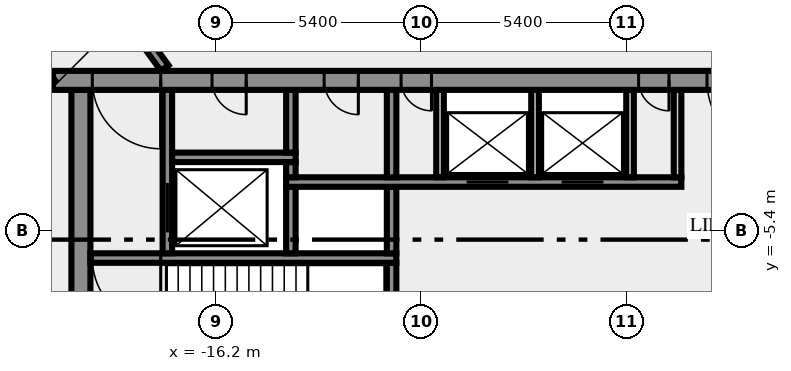
"""IFC4 building model, lengths in metres.
Left out: names, types, materials, properties, quantities, classifications, styles, units other than length and angle.
Written with IfcOpenShell. Run it as: python <this file> out.ifc"""

import sys

from ifc_helpers import new_model, si_unit, direction, frame, frame_2d, origin, place, context, subcontext, project, spatial, rectangle, extrude, element, fill, save


model = new_model("IFC4")
c1 = context("Model", 3, precision=1e-05, world=origin(), true_north=direction((0.0, 1.0)))
c2 = subcontext(c1, "Body", "Model", "MODEL_VIEW")
j1 = project(units=[si_unit("LENGTHUNIT", "METRE"), si_unit("PLANEANGLEUNIT", "RADIAN")], contexts=[c1])
p1 = place(None, origin())
s1 = spatial("IfcSite", under=j1, at=p1, CompositionType="ELEMENT")
p2 = place(p1, origin())
s2 = spatial("IfcBuilding", under=s1, at=p2, CompositionType="ELEMENT")
p3 = place(p2, frame((0.0, 0.0, 261.0)))
s3 = spatial("IfcBuildingStorey", under=s2, at=p3, CompositionType="ELEMENT", Elevation=261.0)
p4 = place(p3, frame((-19.75, -10.5, 0.0), z_axis=(0.0, 0.0, 1.0), x_axis=(0.0, 1.0, 0.0)))
e1 = element("IfcWall", 1, at=p4, inside=s3, PredefinedType="SHEAR", context=c2, shape_type="SweptSolid", body=[
    extrude(rectangle(XDim=8.8, YDim=0.5, at=frame_2d((4.4, 0.0))), origin(), (0.0, 0.0, 1.0), 3.65),
])
p5 = place(p3, frame((-11.575, -7.25, 0.0), z_axis=(0.0, 0.0, 1.0), x_axis=(0.0, 1.0, 0.0)))
e2 = element("IfcWall", 2, at=p5, inside=s3, PredefinedType="SHEAR", context=c2, shape_type="SweptSolid", body=[
    extrude(rectangle(XDim=1.0, YDim=0.25, at=frame_2d((0.5, 0.0))), origin(), (0.0, 0.0, 1.0), 3.65),
])
p6 = place(p3, frame((-11.45, -6.125, 0.0), z_axis=(0.0, 0.0, 1.0), x_axis=(-1.0, 0.0, 0.0)))
e3 = element("IfcWall", 3, at=p6, inside=s3, PredefinedType="SHEAR", context=c2, shape_type="SweptSolid", body=[
    extrude(rectangle(XDim=8.05, YDim=0.25, at=frame_2d((4.025, 0.0))), origin(), (0.0, 0.0, 1.0), 3.65),
])
p7 = place(p6, frame((6.2, 0.0, 0.0)))
e4 = element("IfcOpeningElement", 4, at=p7, cuts=e3, PredefinedType="OPENING", context=c2, shape_type="SweptSolid", body=[
    extrude(rectangle(XDim=1.8, YDim=2.1, at=frame_2d((0.9, 1.05))), frame((0.0, 0.135, 0.0), z_axis=(0.0, -1.0, 0.0), x_axis=(1.0, 0.0, 0.0)), (0.0, 0.0, 1.0), 0.27),
])
p8 = place(p3, frame((-17.475, -6.0, 0.0), z_axis=(0.0, 0.0, 1.0), x_axis=(0.0, 1.0, 0.0)))
e5 = element("IfcWall", 5, at=p8, inside=s3, PredefinedType="SHEAR", context=c2, shape_type="SweptSolid", body=[
    extrude(rectangle(XDim=4.3, YDim=0.25, at=frame_2d((2.15, 0.0))), origin(), (0.0, 0.0, 1.0), 3.65),
])
p9 = place(p8, frame((0.55, 0.0, 0.0)))
e6 = element("IfcOpeningElement", 6, at=p9, cuts=e5, PredefinedType="OPENING", context=c2, shape_type="SweptSolid", body=[
    extrude(rectangle(XDim=1.3, YDim=2.1, at=frame_2d((0.65, 1.05))), frame((0.0, 0.135, 0.0), z_axis=(0.0, -1.0, 0.0), x_axis=(1.0, 0.0, 0.0)), (0.0, 0.0, 1.0), 0.27),
])
for number, where, z_axis, x_axis in (
    (7, (-14.225, -6.0, 0.0), (0.0, 0.0, 1.0), (0.0, 1.0, 0.0)),
    (8, (-11.575, -6.0, 0.0), (0.0, 0.0, 1.0), (0.0, 1.0, 0.0)),
):
    element("IfcWall", number, at=place(p3, frame(where, z_axis=z_axis, x_axis=x_axis)), inside=s3, PredefinedType="SHEAR", context=c2, shape_type="SweptSolid", body=[
        extrude(rectangle(XDim=1.75, YDim=0.25, at=frame_2d((0.875, 0.0))), origin(), (0.0, 0.0, 1.0), 3.65),
    ])
p10 = place(p3, frame((-14.35, -4.125, 0.0), z_axis=(0.0, 0.0, 1.0), x_axis=(1.0, 0.0, 0.0)))
e9 = element("IfcWall", 9, at=p10, inside=s3, PredefinedType="SHEAR", context=c2, shape_type="SweptSolid", body=[
    extrude(rectangle(XDim=10.4, YDim=0.25, at=frame_2d((5.2, 0.0))), origin(), (0.0, 0.0, 1.0), 3.65),
])
p11 = place(p10, frame((4.75, 0.0, 0.0)))
e10 = element("IfcOpeningElement", 10, at=p11, cuts=e9, PredefinedType="OPENING", context=c2, shape_type="SweptSolid", body=[
    extrude(rectangle(XDim=1.1, YDim=2.1, at=frame_2d((0.55, 1.05))), frame((0.0, 0.135, 0.0), z_axis=(0.0, -1.0, 0.0), x_axis=(1.0, 0.0, 0.0)), (0.0, 0.0, 1.0), 0.27),
])
p12 = place(p10, frame((7.25, 0.0, 0.0)))
e11 = element("IfcOpeningElement", 11, at=p12, cuts=e9, PredefinedType="OPENING", context=c2, shape_type="SweptSolid", body=[
    extrude(rectangle(XDim=1.1, YDim=2.1, at=frame_2d((0.55, 1.05))), frame((0.0, 0.135, 0.0), z_axis=(0.0, -1.0, 0.0), x_axis=(1.0, 0.0, 0.0)), (0.0, 0.0, 1.0), 0.27),
])
p13 = place(p3, frame((-14.225, -4.0, 0.0), z_axis=(0.0, 0.0, 1.0), x_axis=(0.0, 1.0, 0.0)))
e12 = element("IfcWall", 12, at=p13, inside=s3, PredefinedType="SHEAR", context=c2, shape_type="SweptSolid", body=[
    extrude(rectangle(XDim=0.4, YDim=0.25, at=frame_2d((0.2, 0.0))), origin(), (0.0, 0.0, 1.0), 3.65),
])
p14 = place(p3, frame((-11.575, -4.0, 0.0), z_axis=(0.0, 0.0, 1.0), x_axis=(0.0, 1.0, 0.0)))
e13 = element("IfcWall", 13, at=p14, inside=s3, PredefinedType="SHEAR", context=c2, shape_type="SweptSolid", body=[
    extrude(rectangle(XDim=2.3, YDim=0.25, at=frame_2d((1.15, 0.0))), origin(), (0.0, 0.0, 1.0), 3.65),
])
for number, where, z_axis, x_axis in (
    (14, (-10.3, -4.0, 0.0), (0.0, 0.0, 1.0), (0.0, 1.0, 0.0)),
    (15, (-7.8, -4.0, 0.0), (0.0, 0.0, 1.0), (0.0, 1.0, 0.0)),
    (16, (-5.3, -4.0, 0.0), (0.0, 0.0, 1.0), (0.0, 1.0, 0.0)),
    (17, (-4.05, -4.0, 0.0), (0.0, 0.0, 1.0), (0.0, 1.0, 0.0)),
):
    element("IfcWall", number, at=place(p3, frame(where, z_axis=z_axis, x_axis=x_axis)), inside=s3, PredefinedType="SOLIDWALL", context=c2, shape_type="SweptSolid", body=[
        extrude(rectangle(XDim=2.3, YDim=0.2, at=frame_2d((1.15, 0.0))), origin(), (0.0, 0.0, 1.0), 3.65),
    ])
p15 = place(p3, frame((-17.35, -3.475, 0.0), z_axis=(0.0, 0.0, 1.0), x_axis=(1.0, 0.0, 0.0)))
e18 = element("IfcWall", 18, at=p15, inside=s3, PredefinedType="SHEAR", context=c2, shape_type="SweptSolid", body=[
    extrude(rectangle(XDim=3.25, YDim=0.25, at=frame_2d((1.625, 0.0))), origin(), (0.0, 0.0, 1.0), 3.65),
])
p16 = place(p3, frame((-14.225, -3.35, 0.0), z_axis=(0.0, 0.0, 1.0), x_axis=(0.0, 1.0, 0.0)))
e19 = element("IfcWall", 19, at=p16, inside=s3, PredefinedType="SHEAR", context=c2, shape_type="SweptSolid", body=[
    extrude(rectangle(XDim=1.65, YDim=0.25, at=frame_2d((0.825, 0.0))), origin(), (0.0, 0.0, 1.0), 3.65),
])
p17 = place(p3, frame((20.49, -1.45, 0.0), z_axis=(0.0, 0.0, 1.0), x_axis=(-1.0, 0.0, 0.0)))
e20 = element("IfcWall", 20, at=p17, inside=s3, PredefinedType="SHEAR", context=c2, shape_type="SweptSolid", body=[
    extrude(rectangle(XDim=40.98, YDim=0.5, at=frame_2d((20.49, 0.0))), origin(), (0.0, 0.0, 1.0), 3.65),
])
p18 = place(p17, frame((38.14, 0.0, 0.0)))
e21 = element("IfcOpeningElement", 21, at=p18, cuts=e20, PredefinedType="OPENING", context=c2, shape_type="SweptSolid", body=[
    extrude(rectangle(XDim=1.8, YDim=2.1, at=frame_2d((0.9, 1.05))), frame((0.0, 0.26, 0.0), z_axis=(0.0, -1.0, 0.0), x_axis=(1.0, 0.0, 0.0)), (0.0, 0.0, 1.0), 0.52),
])
p19 = place(p17, frame((35.89, 0.0, 0.0)))
e22 = element("IfcOpeningElement", 22, at=p19, cuts=e20, PredefinedType="OPENING", context=c2, shape_type="SweptSolid", body=[
    extrude(rectangle(XDim=0.9, YDim=2.1, at=frame_2d((0.45, 1.05))), frame((0.0, 0.26, 0.0), z_axis=(0.0, -1.0, 0.0), x_axis=(1.0, 0.0, 0.0)), (0.0, 0.0, 1.0), 0.52),
])
p20 = place(p17, frame((32.94, 0.0, 0.0)))
e23 = element("IfcOpeningElement", 23, at=p20, cuts=e20, PredefinedType="OPENING", context=c2, shape_type="SweptSolid", body=[
    extrude(rectangle(XDim=0.9, YDim=2.1, at=frame_2d((0.45, 1.05))), frame((0.0, 0.26, 0.0), z_axis=(0.0, -1.0, 0.0), x_axis=(1.0, 0.0, 0.0)), (0.0, 0.0, 1.0), 0.52),
])
p21 = place(p17, frame((31.015, 0.0, 0.0)))
e24 = element("IfcOpeningElement", 24, at=p21, cuts=e20, PredefinedType="OPENING", context=c2, shape_type="SweptSolid", body=[
    extrude(rectangle(XDim=0.8, YDim=2.1, at=frame_2d((0.4, 1.05))), frame((0.0, 0.26, 0.0), z_axis=(0.0, -1.0, 0.0), x_axis=(1.0, 0.0, 0.0)), (0.0, 0.0, 1.0), 0.52),
])
p22 = place(p17, frame((24.765, 0.0, 0.0)))
e25 = element("IfcOpeningElement", 25, at=p22, cuts=e20, PredefinedType="OPENING", context=c2, shape_type="SweptSolid", body=[
    extrude(rectangle(XDim=0.8, YDim=2.1, at=frame_2d((0.4, 1.05))), frame((0.0, 0.26, 0.0), z_axis=(0.0, -1.0, 0.0), x_axis=(1.0, 0.0, 0.0)), (0.0, 0.0, 1.0), 0.52),
])
p23 = place(p17, frame((21.765, 0.0, 0.0)))
e26 = element("IfcOpeningElement", 26, at=p23, cuts=e20, PredefinedType="OPENING", context=c2, shape_type="SweptSolid", body=[
    extrude(rectangle(XDim=2.0, YDim=2.1, at=frame_2d((1.0, 1.05))), frame((0.0, 0.26, 0.0), z_axis=(0.0, -1.0, 0.0), x_axis=(1.0, 0.0, 0.0)), (0.0, 0.0, 1.0), 0.52),
])
p24 = place(p17, frame((14.202, 0.0, 0.0)))
e27 = element("IfcOpeningElement", 27, at=p24, cuts=e20, PredefinedType="OPENING", context=c2, shape_type="SweptSolid", body=[
    extrude(rectangle(XDim=0.9, YDim=2.1, at=frame_2d((0.45, 1.05))), frame((0.0, 0.26, 0.0), z_axis=(0.0, -1.0, 0.0), x_axis=(1.0, 0.0, 0.0)), (0.0, 0.0, 1.0), 0.52),
])
p25 = place(p17, frame((10.478, 0.0, 0.0)))
e28 = element("IfcOpeningElement", 28, at=p25, cuts=e20, PredefinedType="OPENING", context=c2, shape_type="SweptSolid", body=[
    extrude(rectangle(XDim=0.9, YDim=2.1, at=frame_2d((0.45, 1.05))), frame((0.0, 0.26, 0.0), z_axis=(0.0, -1.0, 0.0), x_axis=(1.0, 0.0, 0.0)), (0.0, 0.0, 1.0), 0.52),
])
p26 = place(p17, frame((7.14, 0.0, 0.0)))
e29 = element("IfcOpeningElement", 29, at=p26, cuts=e20, PredefinedType="OPENING", context=c2, shape_type="SweptSolid", body=[
    extrude(rectangle(XDim=0.9, YDim=2.1, at=frame_2d((0.45, 1.05))), frame((0.0, 0.26, 0.0), z_axis=(0.0, -1.0, 0.0), x_axis=(1.0, 0.0, 0.0)), (0.0, 0.0, 1.0), 0.52),
])
p27 = place(p17, frame((5.028, 0.0, 0.0)))
e30 = element("IfcOpeningElement", 30, at=p27, cuts=e20, PredefinedType="OPENING", context=c2, shape_type="SweptSolid", body=[
    extrude(rectangle(XDim=0.8, YDim=2.1, at=frame_2d((0.4, 1.05))), frame((0.0, 0.26, 0.0), z_axis=(0.0, -1.0, 0.0), x_axis=(1.0, 0.0, 0.0)), (0.0, 0.0, 1.0), 0.52),
])
p28 = place(p17, frame((3.452, 0.0, 0.0)))
e31 = element("IfcOpeningElement", 31, at=p28, cuts=e20, PredefinedType="OPENING", context=c2, shape_type="SweptSolid", body=[
    extrude(rectangle(XDim=0.8, YDim=2.1, at=frame_2d((0.4, 1.05))), frame((0.0, 0.26, 0.0), z_axis=(0.0, -1.0, 0.0), x_axis=(1.0, 0.0, 0.0)), (0.0, 0.0, 1.0), 0.52),
])
p29 = place(p17, frame((1.04, 0.0, 0.0)))
e32 = element("IfcOpeningElement", 32, at=p29, cuts=e20, PredefinedType="OPENING", context=c2, shape_type="SweptSolid", body=[
    extrude(rectangle(XDim=1.8, YDim=2.1, at=frame_2d((0.9, 1.05))), frame((0.0, 0.26, 0.0), z_axis=(0.0, -1.0, 0.0), x_axis=(1.0, 0.0, 0.0)), (0.0, 0.0, 1.0), 0.52),
])
p30 = place(p3, frame((-20.531, -1.523, 0.0), z_axis=(0.0, 0.0, 1.0), x_axis=(-0.587782646447, 0.809018887626, 0.0)))
e33 = element("IfcWall", 33, at=p30, inside=s3, PredefinedType="SOLIDWALL", context=c2, shape_type="SweptSolid", body=[
    extrude(rectangle(XDim=11.27, YDim=0.25, at=frame_2d((5.635, 0.0))), origin(), (0.0, 0.0, 1.0), 3.65),
])
p31 = place(p30, frame((0.533, 0.0, 0.0)))
e34 = element("IfcOpeningElement", 34, at=p31, cuts=e33, PredefinedType="OPENING", context=c2, shape_type="SweptSolid", body=[
    extrude(rectangle(XDim=0.9, YDim=2.1, at=frame_2d((0.45, 1.05))), frame((0.0, 0.135, 0.0), z_axis=(0.0, -1.0, 0.0), x_axis=(1.0, 0.0, 0.0)), (0.0, 0.0, 1.0), 0.27),
])
p32 = place(p3, frame((-24.865, 8.95, 0.0), z_axis=(0.0, 0.0, 1.0), x_axis=(0.587791617212, -0.809012369952, 0.0)))
e35 = element("IfcWall", 35, at=p32, inside=s3, PredefinedType="SOLIDWALL", context=c2, shape_type="SweptSolid", body=[
    extrude(rectangle(XDim=12.453, YDim=0.25, at=frame_2d((6.227, 0.0))), origin(), (0.0, 0.0, 1.0), 3.65),
])
p33 = place(p32, frame((8.112, 0.0, 0.0)))
e36 = element("IfcOpeningElement", 36, at=p33, cuts=e35, PredefinedType="OPENING", context=c2, shape_type="SweptSolid", body=[
    extrude(rectangle(XDim=0.9, YDim=2.1, at=frame_2d((0.45, 1.05))), frame((0.0, 0.135, 0.0), z_axis=(0.0, -1.0, 0.0), x_axis=(1.0, 0.0, 0.0)), (0.0, 0.0, 1.0), 0.27),
])
p34 = place(p7, origin())
e37 = element("IfcDoor", 37, at=p34, inside=s3, OperationType="DOUBLE_DOOR_SINGLE_SWING", PredefinedType="DOOR", context=c2, shape_type="SweptSolid", body=[
    extrude(rectangle(XDim=1.8, YDim=2.1, at=frame_2d((0.9, 1.05))), frame((0.0, 0.025, 0.0), z_axis=(0.0, -1.0, 0.0), x_axis=(1.0, 0.0, 0.0)), (0.0, 0.0, 1.0), 0.05),
])
fill(e4, e37)
p35 = place(p9, origin())
e38 = element("IfcDoor", 38, at=p35, inside=s3, OperationType="DOUBLE_DOOR_SLIDING", PredefinedType="DOOR", context=c2, shape_type="SweptSolid", body=[
    extrude(rectangle(XDim=1.3, YDim=2.1, at=frame_2d((0.65, 1.05))), frame((0.0, 0.025, 0.0), z_axis=(0.0, -1.0, 0.0), x_axis=(1.0, 0.0, 0.0)), (0.0, 0.0, 1.0), 0.05),
])
fill(e6, e38)
p36 = place(p11, origin())
e39 = element("IfcDoor", 39, at=p36, inside=s3, OperationType="DOUBLE_DOOR_SLIDING", PredefinedType="DOOR", context=c2, shape_type="SweptSolid", body=[
    extrude(rectangle(XDim=1.1, YDim=2.1, at=frame_2d((0.55, 1.05))), frame((0.0, 0.025, 0.0), z_axis=(0.0, -1.0, 0.0), x_axis=(1.0, 0.0, 0.0)), (0.0, 0.0, 1.0), 0.05),
])
fill(e10, e39)
p37 = place(p12, origin())
e40 = element("IfcDoor", 40, at=p37, inside=s3, OperationType="DOUBLE_DOOR_SLIDING", PredefinedType="DOOR", context=c2, shape_type="SweptSolid", body=[
    extrude(rectangle(XDim=1.1, YDim=2.1, at=frame_2d((0.55, 1.05))), frame((0.0, 0.025, 0.0), z_axis=(0.0, -1.0, 0.0), x_axis=(1.0, 0.0, 0.0)), (0.0, 0.0, 1.0), 0.05),
])
fill(e11, e40)
p38 = place(p18, origin())
e41 = element("IfcDoor", 41, at=p38, inside=s3, OperationType="DOUBLE_DOOR_SINGLE_SWING", PredefinedType="DOOR", context=c2, shape_type="SweptSolid", body=[
    extrude(rectangle(XDim=1.8, YDim=2.1, at=frame_2d((0.9, 1.05))), frame((0.0, 0.025, 0.0), z_axis=(0.0, -1.0, 0.0), x_axis=(1.0, 0.0, 0.0)), (0.0, 0.0, 1.0), 0.05),
])
fill(e21, e41)
p39 = place(p19, origin())
e42 = element("IfcDoor", 42, at=p39, inside=s3, OperationType="SINGLE_SWING_RIGHT", PredefinedType="DOOR", context=c2, shape_type="SweptSolid", body=[
    extrude(rectangle(XDim=0.9, YDim=2.1, at=frame_2d((0.45, 1.05))), frame((0.0, 0.025, 0.0), z_axis=(0.0, -1.0, 0.0), x_axis=(1.0, 0.0, 0.0)), (0.0, 0.0, 1.0), 0.05),
])
fill(e22, e42)
p40 = place(p20, origin())
e43 = element("IfcDoor", 43, at=p40, inside=s3, OperationType="SINGLE_SWING_RIGHT", PredefinedType="DOOR", context=c2, shape_type="SweptSolid", body=[
    extrude(rectangle(XDim=0.9, YDim=2.1, at=frame_2d((0.45, 1.05))), frame((0.0, 0.025, 0.0), z_axis=(0.0, -1.0, 0.0), x_axis=(1.0, 0.0, 0.0)), (0.0, 0.0, 1.0), 0.05),
])
fill(e23, e43)
p41 = place(p21, origin())
e44 = element("IfcDoor", 44, at=p41, inside=s3, OperationType="SINGLE_SWING_RIGHT", PredefinedType="DOOR", context=c2, shape_type="SweptSolid", body=[
    extrude(rectangle(XDim=0.8, YDim=2.1, at=frame_2d((0.4, 1.05))), frame((0.0, 0.025, 0.0), z_axis=(0.0, -1.0, 0.0), x_axis=(1.0, 0.0, 0.0)), (0.0, 0.0, 1.0), 0.05),
])
fill(e24, e44)
p42 = place(p22, origin())
e45 = element("IfcDoor", 45, at=p42, inside=s3, OperationType="SINGLE_SWING_RIGHT", PredefinedType="DOOR", context=c2, shape_type="SweptSolid", body=[
    extrude(rectangle(XDim=0.8, YDim=2.1, at=frame_2d((0.4, 1.05))), frame((0.0, 0.025, 0.0), z_axis=(0.0, -1.0, 0.0), x_axis=(1.0, 0.0, 0.0)), (0.0, 0.0, 1.0), 0.05),
])
fill(e25, e45)
p43 = place(p23, origin())
e46 = element("IfcDoor", 46, at=p43, inside=s3, OperationType="DOUBLE_DOOR_SINGLE_SWING", PredefinedType="DOOR", context=c2, shape_type="SweptSolid", body=[
    extrude(rectangle(XDim=2.0, YDim=2.1, at=frame_2d((1.0, 1.05))), frame((0.0, 0.025, 0.0), z_axis=(0.0, -1.0, 0.0), x_axis=(1.0, 0.0, 0.0)), (0.0, 0.0, 1.0), 0.05),
])
fill(e26, e46)
save(model, sys.argv[1])
